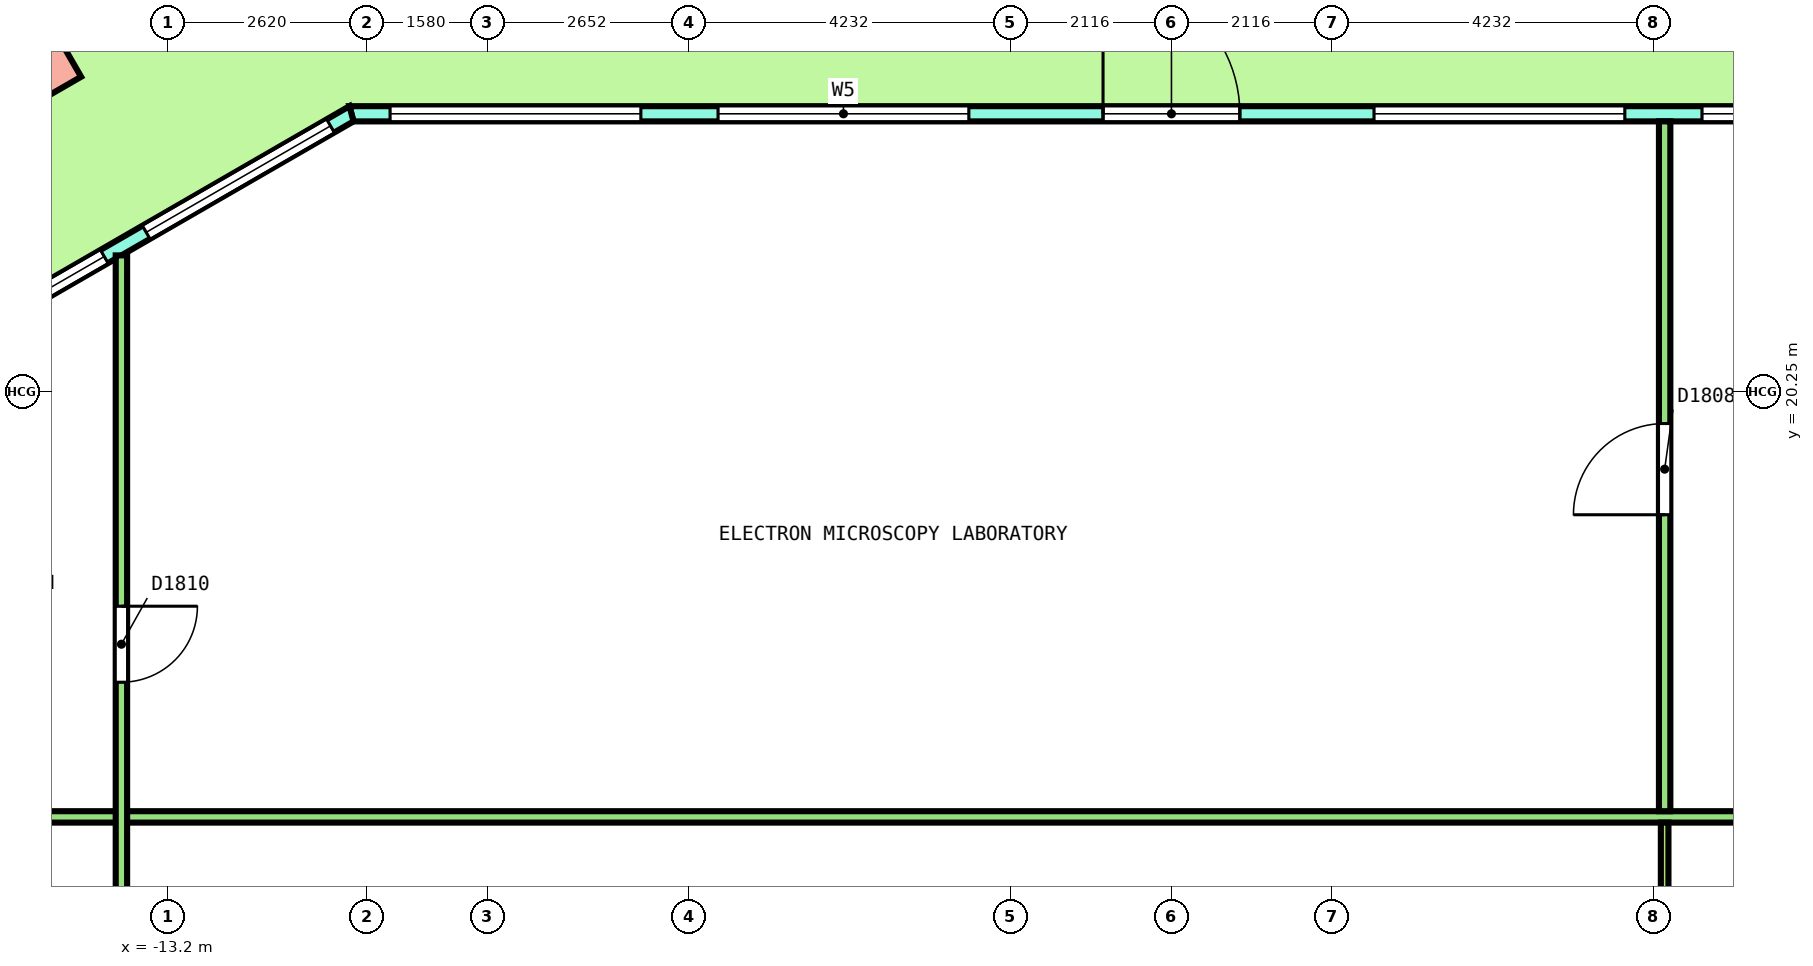
"""IFC4 building model, lengths in metres.
Left out: names, types, materials, properties, quantities, classifications, styles, units other than length and angle.
Written with IfcOpenShell. Run it as: python <this file> out.ifc"""

import sys

from ifc_helpers import new_model, si_unit, direction, frame, frame_2d, origin, origin_2d, place, context, subcontext, project, spatial, polyline, rectangle, outline, extrude, element, fill, save


model = new_model("IFC4")
c1 = context("Model", 3, precision=1e-05, world=origin(), true_north=direction((0.0, 1.0)))
c2 = subcontext(c1, "Body", "Model", "MODEL_VIEW")
j1 = project(units=[si_unit("LENGTHUNIT", "METRE"), si_unit("PLANEANGLEUNIT", "RADIAN")], contexts=[c1])
p1 = place(None, origin())
s1 = spatial("IfcSite", under=j1, at=p1, CompositionType="ELEMENT")
p2 = place(p1, origin())
s2 = spatial("IfcBuilding", under=s1, at=p2, CompositionType="ELEMENT")
p3 = place(p2, frame((0.0, 0.0, 171.6)))
s3 = spatial("IfcBuildingStorey", under=s2, at=p3, CompositionType="ELEMENT", Elevation=171.6)
p4 = place(p3, frame((-15.164, 24.606, 0.0), z_axis=(-0.036267419622, 0.0, 0.999342120734), x_axis=(-0.865313477853, -0.500246354177, -0.031403346616)))
e1 = element("IfcColumn", 1, at=p4, inside=s3, PredefinedType="COLUMN", context=c2, shape_type="SweptSolid", body=[
    extrude(rectangle(XDim=1.2, YDim=1.2, at=origin_2d()), origin(), (0.0, 0.0, 1.0), 4.052),
])
p5 = place(p3, frame((10.788, 23.9, 0.0), z_axis=(0.0, 0.0, 1.0), x_axis=(-1.0, 0.0, 0.0)))
e2 = element("IfcWall", 2, at=p5, inside=s3, PredefinedType="SOLIDWALL", context=c2, shape_type="SweptSolid", body=[
    extrude(outline(polyline([(-0.027, -0.1), (1.003, -0.1), (2.033, -0.1), (3.063, -0.1), (4.093, -0.1), (5.123, -0.1), (6.153, -0.1), (7.183, -0.1), (8.213, -0.1), (9.243, -0.1), (10.273, -0.1), (11.302, -0.1), (12.333, -0.1), (13.363, -0.1), (14.392, -0.1), (15.422, -0.1), (16.452, -0.1), (17.482, -0.1), (18.512, -0.1), (19.542, -0.1), (20.572, -0.1), (21.602, -0.1), (21.548, 0.1), (20.523, 0.1), (19.499, 0.1), (18.474, 0.1), (17.449, 0.1), (16.424, 0.1), (15.399, 0.1), (14.375, 0.1), (13.35, 0.1), (12.325, 0.1), (11.3, 0.1), (10.275, 0.1), (9.25, 0.1), (8.226, 0.1), (7.201, 0.1), (6.176, 0.1), (5.151, 0.1), (4.126, 0.1), (3.101, 0.1), (2.076, 0.1), (1.052, 0.1), (0.027, 0.1), (-0.027, -0.1)])), origin(), (0.0, 0.0, 1.0), 4.1),
])
p6 = place(p5, frame((0.508, 0.0, 0.1)))
e3 = element("IfcOpeningElement", 3, at=p6, cuts=e2, PredefinedType="OPENING", context=c2, shape_type="SweptSolid", body=[
    extrude(rectangle(XDim=3.3, YDim=2.9, at=frame_2d((1.65, 1.45))), frame((0.0, 0.11, 0.0), z_axis=(0.0, -1.0, 0.0), x_axis=(1.0, 0.0, 0.0)), (0.0, 0.0, 1.0), 0.22),
])
p7 = place(p5, frame((4.823, 0.0, 0.1)))
e4 = element("IfcOpeningElement", 4, at=p7, cuts=e2, PredefinedType="OPENING", context=c2, shape_type="SweptSolid", body=[
    extrude(rectangle(XDim=3.3, YDim=2.9, at=frame_2d((1.65, 1.45))), frame((0.0, 0.11, 0.0), z_axis=(0.0, -1.0, 0.0), x_axis=(1.0, 0.0, 0.0)), (0.0, 0.0, 1.0), 0.22),
])
p8 = place(p5, frame((9.888, 0.0, 0.0)))
e5 = element("IfcOpeningElement", 5, at=p8, cuts=e2, PredefinedType="OPENING", context=c2, shape_type="SweptSolid", body=[
    extrude(rectangle(XDim=1.8, YDim=2.4, at=frame_2d((0.9, 1.2))), frame((0.0, 0.11, 0.0), z_axis=(0.0, -1.0, 0.0), x_axis=(1.0, 0.0, 0.0)), (0.0, 0.0, 1.0), 0.22),
])
p9 = place(p5, frame((9.888, 0.0, 2.55)))
e6 = element("IfcOpeningElement", 6, at=p9, cuts=e2, PredefinedType="OPENING", context=c2, shape_type="SweptSolid", body=[
    extrude(rectangle(XDim=1.8, YDim=0.45, at=frame_2d((0.9, 0.225))), frame((0.0, 0.11, 0.0), z_axis=(0.0, -1.0, 0.0), x_axis=(1.0, 0.0, 0.0)), (0.0, 0.0, 1.0), 0.22),
])
p10 = place(p5, frame((13.453, 0.0, 0.1)))
e7 = element("IfcOpeningElement", 7, at=p10, cuts=e2, PredefinedType="OPENING", context=c2, shape_type="SweptSolid", body=[
    extrude(rectangle(XDim=3.3, YDim=2.9, at=frame_2d((1.65, 1.45))), frame((0.0, 0.11, 0.0), z_axis=(0.0, -1.0, 0.0), x_axis=(1.0, 0.0, 0.0)), (0.0, 0.0, 1.0), 0.22),
])
p11 = place(p5, frame((17.768, 0.0, 0.1)))
e8 = element("IfcOpeningElement", 8, at=p11, cuts=e2, PredefinedType="OPENING", context=c2, shape_type="SweptSolid", body=[
    extrude(rectangle(XDim=3.3, YDim=2.9, at=frame_2d((1.65, 1.45))), frame((0.0, 0.11, 0.0), z_axis=(0.0, -1.0, 0.0), x_axis=(1.0, 0.0, 0.0)), (0.0, 0.0, 1.0), 0.22),
])
p12 = place(p3, frame((-10.788, 23.9, 0.0), z_axis=(0.0, 0.0, 1.0), x_axis=(-0.866029458321, -0.49999297727, 0.0)))
e9 = element("IfcWall", 9, at=p12, inside=s3, PredefinedType="SOLIDWALL", context=c2, shape_type="SweptSolid", body=[
    extrude(outline(polyline([(-0.027, -0.1), (1.128, -0.1), (2.282, -0.1), (3.437, -0.1), (4.592, -0.1), (5.747, -0.1), (6.901, -0.1), (6.848, 0.1), (5.711, 0.1), (4.574, 0.1), (3.437, 0.1), (2.301, 0.1), (1.164, 0.1), (0.027, 0.1), (-0.027, -0.1)])), origin(), (0.0, 0.0, 1.0), 4.1),
])
p13 = place(p12, frame((0.319, 0.0, 0.1)))
e10 = element("IfcOpeningElement", 10, at=p13, cuts=e9, PredefinedType="OPENING", context=c2, shape_type="SweptSolid", body=[
    extrude(rectangle(XDim=2.8, YDim=2.9, at=frame_2d((1.4, 1.45))), frame((0.0, 0.11, 0.0), z_axis=(0.0, -1.0, 0.0), x_axis=(1.0, 0.0, 0.0)), (0.0, 0.0, 1.0), 0.22),
])
p14 = place(p12, frame((3.756, 0.0, 0.1)))
e11 = element("IfcOpeningElement", 11, at=p14, cuts=e9, PredefinedType="OPENING", context=c2, shape_type="SweptSolid", body=[
    extrude(rectangle(XDim=2.8, YDim=2.9, at=frame_2d((1.4, 1.45))), frame((0.0, 0.11, 0.0), z_axis=(0.0, -1.0, 0.0), x_axis=(1.0, 0.0, 0.0)), (0.0, 0.0, 1.0), 0.22),
])
p15 = place(p3, frame((-19.675, 14.65, 0.0), z_axis=(0.0, 0.0, 1.0), x_axis=(1.0, 0.0, 0.0)))
e12 = element("IfcWall", 12, at=p15, inside=s3, PredefinedType="PARTITIONING", context=c2, shape_type="SweptSolid", body=[
    extrude(rectangle(XDim=39.5, YDim=0.15, at=frame_2d((19.75, 0.0))), origin(), (0.0, 0.0, 1.0), 3.05),
])
p16 = place(p15, frame((30.308, 0.0, 0.0)))
e13 = element("IfcOpeningElement", 13, at=p16, cuts=e12, PredefinedType="OPENING", context=c2, shape_type="SweptSolid", body=[
    extrude(rectangle(XDim=1.2, YDim=2.1, at=frame_2d((0.6, 1.05))), frame((0.0, 0.085, 0.0), z_axis=(0.0, -1.0, 0.0), x_axis=(1.0, 0.0, 0.0)), (0.0, 0.0, 1.0), 0.17),
])
p17 = place(p3, frame((6.489, 14.725, 0.0), z_axis=(0.0, 0.0, 1.0), x_axis=(0.0, 1.0, 0.0)))
e14 = element("IfcWall", 14, at=p17, inside=s3, PredefinedType="PARTITIONING", context=c2, shape_type="SweptSolid", body=[
    extrude(rectangle(XDim=9.075, YDim=0.15, at=frame_2d((4.538, 0.0))), origin(), (0.0, 0.0, 1.0), 3.05),
])
p18 = place(p17, frame((3.9, 0.0, 0.0)))
e15 = element("IfcOpeningElement", 15, at=p18, cuts=e14, PredefinedType="OPENING", context=c2, shape_type="SweptSolid", body=[
    extrude(rectangle(XDim=1.2, YDim=2.1, at=frame_2d((0.6, 1.05))), frame((0.0, 0.085, 0.0), z_axis=(0.0, -1.0, 0.0), x_axis=(1.0, 0.0, 0.0)), (0.0, 0.0, 1.0), 0.17),
])
p19 = place(p3, frame((-13.814, 10.325, 0.0), z_axis=(0.0, 0.0, 1.0), x_axis=(0.0, 1.0, 0.0)))
e16 = element("IfcWall", 16, at=p19, inside=s3, PredefinedType="PARTITIONING", context=c2, shape_type="SweptSolid", body=[
    extrude(rectangle(XDim=11.712, YDim=0.15, at=frame_2d((5.856, 0.0))), origin(), (0.0, 0.0, 1.0), 3.05),
])
p20 = place(p19, frame((6.097, 0.0, 0.0)))
e17 = element("IfcOpeningElement", 17, at=p20, cuts=e16, PredefinedType="OPENING", context=c2, shape_type="SweptSolid", body=[
    extrude(rectangle(XDim=1.0, YDim=2.1, at=frame_2d((0.5, 1.05))), frame((0.0, 0.085, 0.0), z_axis=(0.0, -1.0, 0.0), x_axis=(1.0, 0.0, 0.0)), (0.0, 0.0, 1.0), 0.17),
])
p21 = place(p19, frame((1.22, 0.0, 0.0)))
e18 = element("IfcOpeningElement", 18, at=p21, cuts=e16, PredefinedType="OPENING", context=c2, shape_type="SweptSolid", body=[
    extrude(rectangle(XDim=1.0, YDim=2.1, at=frame_2d((0.5, 1.05))), frame((0.0, 0.085, 0.0), z_axis=(0.0, -1.0, 0.0), x_axis=(1.0, 0.0, 0.0)), (0.0, 0.0, 1.0), 0.17),
])
p22 = place(p3, frame((6.489, 10.325, 0.0), z_axis=(0.0, 0.0, 1.0), x_axis=(0.0, 1.0, 0.0)))
e19 = element("IfcWall", 19, at=p22, inside=s3, PredefinedType="PARTITIONING", context=c2, shape_type="SweptSolid", body=[
    extrude(rectangle(XDim=4.25, YDim=0.1, at=frame_2d((2.125, 0.0))), origin(), (0.0, 0.0, 1.0), 3.05),
])
p23 = place(p6, origin())
e20 = element("IfcWindow", 20, at=p23, inside=s3, PartitioningType="SINGLE_PANEL", PredefinedType="WINDOW", context=c2, shape_type="SweptSolid", body=[
    extrude(rectangle(XDim=3.3, YDim=2.9, at=frame_2d((1.65, 1.45))), frame((0.0, 0.03, 0.0), z_axis=(0.0, -1.0, 0.0), x_axis=(1.0, 0.0, 0.0)), (0.0, 0.0, 1.0), 0.06),
])
fill(e3, e20)
p24 = place(p7, origin())
e21 = element("IfcWindow", 21, at=p24, inside=s3, PartitioningType="SINGLE_PANEL", PredefinedType="WINDOW", context=c2, shape_type="SweptSolid", body=[
    extrude(rectangle(XDim=3.3, YDim=2.9, at=frame_2d((1.65, 1.45))), frame((0.0, 0.03, 0.0), z_axis=(0.0, -1.0, 0.0), x_axis=(1.0, 0.0, 0.0)), (0.0, 0.0, 1.0), 0.06),
])
fill(e4, e21)
p25 = place(p8, origin())
e22 = element("IfcDoor", 22, at=p25, inside=s3, OperationType="DOUBLE_DOOR_SINGLE_SWING", PredefinedType="DOOR", context=c2, shape_type="SweptSolid", body=[
    extrude(rectangle(XDim=1.8, YDim=2.4, at=frame_2d((0.9, 1.2))), frame((0.0, 0.025, 0.0), z_axis=(0.0, -1.0, 0.0), x_axis=(1.0, 0.0, 0.0)), (0.0, 0.0, 1.0), 0.05),
])
fill(e5, e22)
p26 = place(p9, origin())
e23 = element("IfcWindow", 23, at=p26, inside=s3, PartitioningType="SINGLE_PANEL", PredefinedType="WINDOW", context=c2, shape_type="SweptSolid", body=[
    extrude(rectangle(XDim=1.8, YDim=0.45, at=frame_2d((0.9, 0.225))), frame((0.0, 0.03, 0.0), z_axis=(0.0, -1.0, 0.0), x_axis=(1.0, 0.0, 0.0)), (0.0, 0.0, 1.0), 0.06),
])
fill(e6, e23)
p27 = place(p10, origin())
e24 = element("IfcWindow", 24, at=p27, inside=s3, PartitioningType="SINGLE_PANEL", PredefinedType="WINDOW", context=c2, shape_type="SweptSolid", body=[
    extrude(rectangle(XDim=3.3, YDim=2.9, at=frame_2d((1.65, 1.45))), frame((0.0, 0.03, 0.0), z_axis=(0.0, -1.0, 0.0), x_axis=(1.0, 0.0, 0.0)), (0.0, 0.0, 1.0), 0.06),
])
fill(e7, e24)
p28 = place(p11, origin())
e25 = element("IfcWindow", 25, at=p28, inside=s3, PartitioningType="SINGLE_PANEL", PredefinedType="WINDOW", context=c2, shape_type="SweptSolid", body=[
    extrude(rectangle(XDim=3.3, YDim=2.9, at=frame_2d((1.65, 1.45))), frame((0.0, 0.03, 0.0), z_axis=(0.0, -1.0, 0.0), x_axis=(1.0, 0.0, 0.0)), (0.0, 0.0, 1.0), 0.06),
])
fill(e8, e25)
p29 = place(p13, origin())
e26 = element("IfcWindow", 26, at=p29, inside=s3, PartitioningType="SINGLE_PANEL", PredefinedType="WINDOW", context=c2, shape_type="SweptSolid", body=[
    extrude(rectangle(XDim=2.8, YDim=2.9, at=frame_2d((1.4, 1.45))), frame((0.0, 0.03, 0.0), z_axis=(0.0, -1.0, 0.0), x_axis=(1.0, 0.0, 0.0)), (0.0, 0.0, 1.0), 0.06),
])
fill(e10, e26)
p30 = place(p14, origin())
e27 = element("IfcWindow", 27, at=p30, inside=s3, PartitioningType="SINGLE_PANEL", PredefinedType="WINDOW", context=c2, shape_type="SweptSolid", body=[
    extrude(rectangle(XDim=2.8, YDim=2.9, at=frame_2d((1.4, 1.45))), frame((0.0, 0.03, 0.0), z_axis=(0.0, -1.0, 0.0), x_axis=(1.0, 0.0, 0.0)), (0.0, 0.0, 1.0), 0.06),
])
fill(e11, e27)
p31 = place(p18, origin())
e28 = element("IfcDoor", 28, at=p31, inside=s3, OperationType="DOUBLE_DOOR_SINGLE_SWING", PredefinedType="DOOR", context=c2, shape_type="SweptSolid", body=[
    extrude(rectangle(XDim=1.2, YDim=2.1, at=frame_2d((0.6, 1.05))), frame((0.0, 0.025, 0.0), z_axis=(0.0, -1.0, 0.0), x_axis=(1.0, 0.0, 0.0)), (0.0, 0.0, 1.0), 0.05),
])
fill(e15, e28)
p32 = place(p20, origin())
e29 = element("IfcDoor", 29, at=p32, inside=s3, OperationType="SINGLE_SWING_RIGHT", PredefinedType="DOOR", context=c2, shape_type="SweptSolid", body=[
    extrude(rectangle(XDim=1.0, YDim=2.1, at=frame_2d((0.5, 1.05))), frame((0.0, 0.025, 0.0), z_axis=(0.0, -1.0, 0.0), x_axis=(1.0, 0.0, 0.0)), (0.0, 0.0, 1.0), 0.05),
])
fill(e17, e29)
save(model, sys.argv[1])
